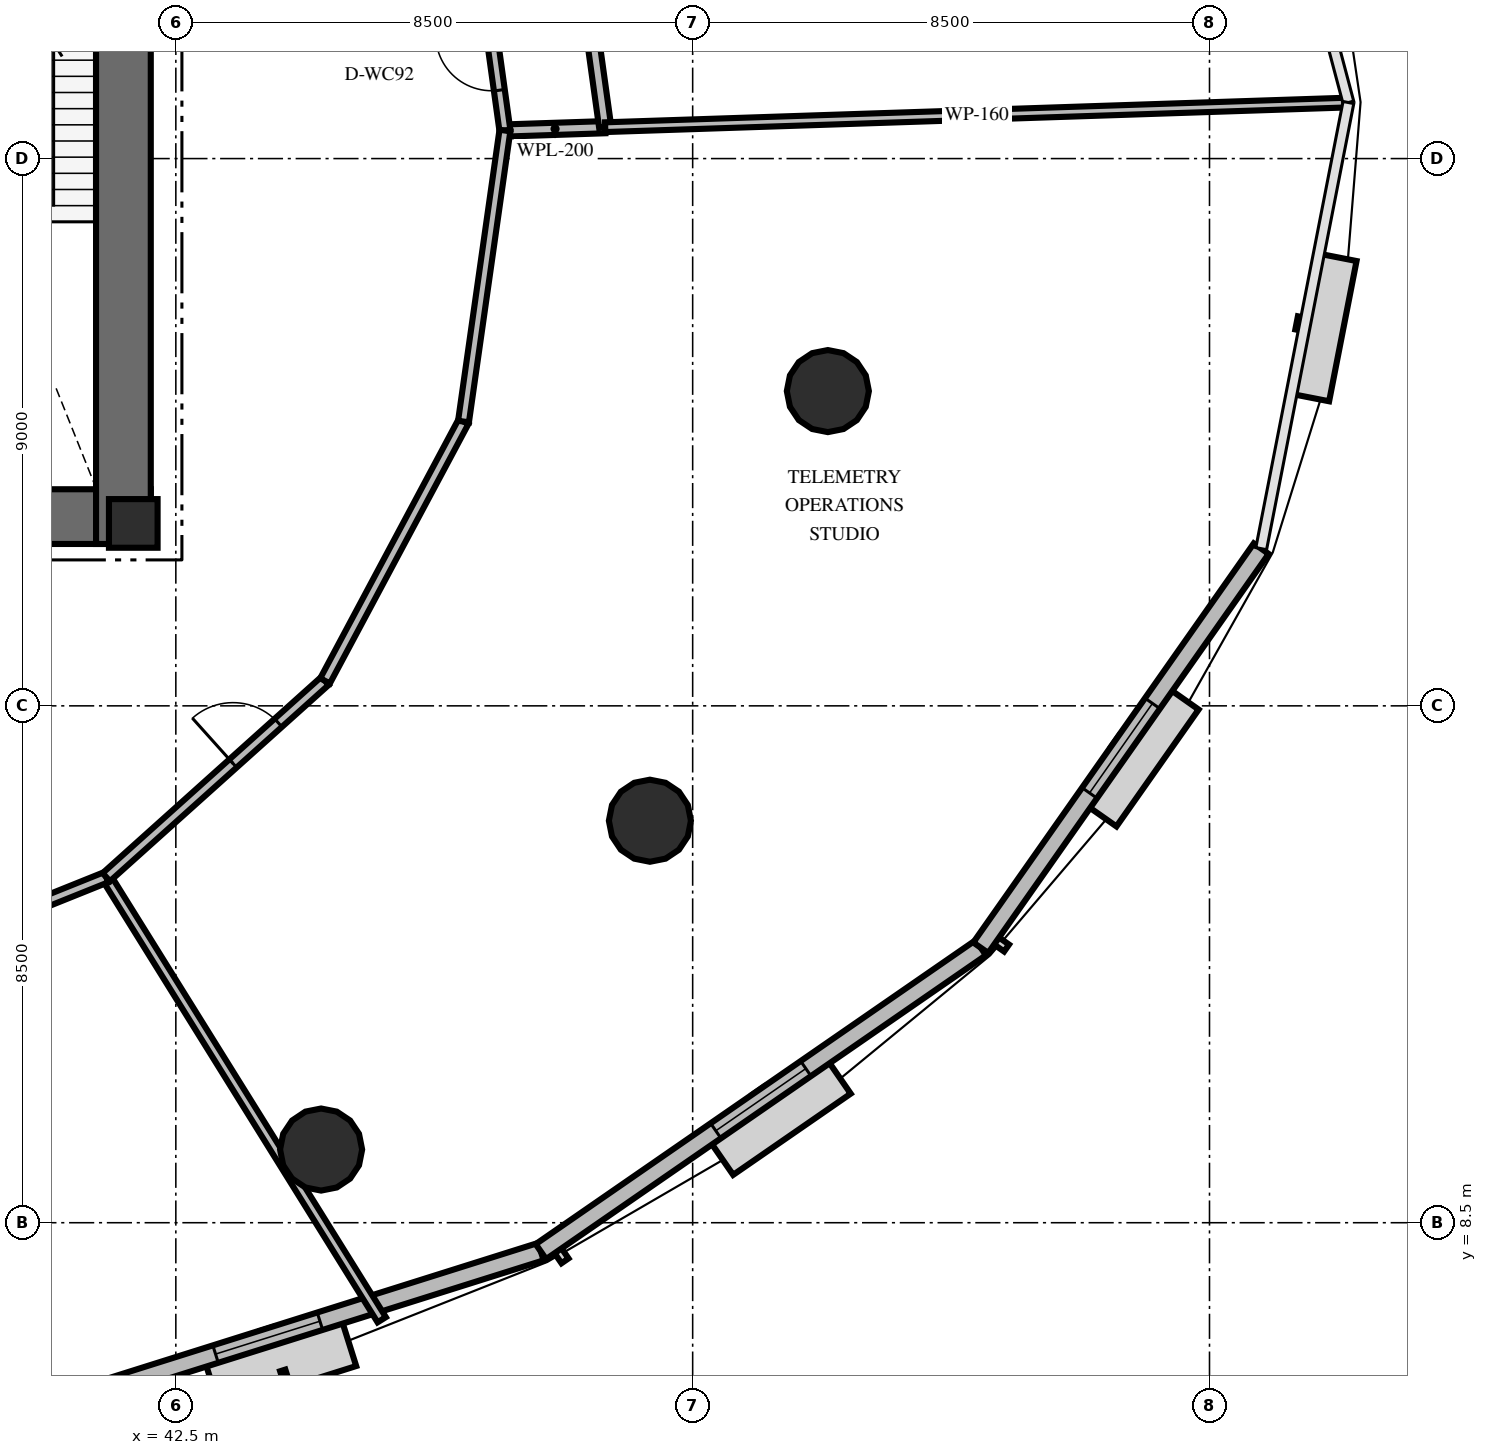
"""IFC4 building model, lengths in metres.
Left out: names, types, materials, properties, quantities, classifications, styles, units other than length and angle.
Written with IfcOpenShell. Run it as: python <this file> out.ifc"""

import sys

from ifc_helpers import new_model, si_unit, direction, frame, frame_2d, origin, origin_2d, place, context, subcontext, project, spatial, rectangle, circle, extrude, element, fill, save


model = new_model("IFC4")
c1 = context("Model", 3, precision=1e-05, world=origin(), true_north=direction((0.0, 1.0)))
c2 = subcontext(c1, "Body", "Model", "MODEL_VIEW")
j1 = project(units=[si_unit("LENGTHUNIT", "METRE"), si_unit("PLANEANGLEUNIT", "RADIAN")], contexts=[c1])
p1 = place(None, origin())
s1 = spatial("IfcSite", under=j1, at=p1, CompositionType="ELEMENT")
p2 = place(p1, origin())
s2 = spatial("IfcBuilding", under=s1, at=p2, CompositionType="ELEMENT")
p3 = place(p2, frame((0.0, 0.0, 38.4)))
s3 = spatial("IfcBuildingStorey", under=s2, at=p3, CompositionType="ELEMENT", Elevation=38.4)
p4 = place(p3, frame((25.922, 20.112, 0.0), z_axis=(0.0, 0.0, 1.0), x_axis=(1.0, 0.0, 0.0)))
e1 = element("IfcWall", 1, at=p4, inside=s3, PredefinedType="SHEAR", context=c2, shape_type="SweptSolid", body=[
    extrude(rectangle(XDim=16.166, YDim=0.9, at=frame_2d((8.083, 0.0))), origin(), (0.0, 0.0, 1.0), 4.2),
])
p5 = place(p3, frame((41.638, 19.662, 0.0), z_axis=(0.0, 0.0, 1.0), x_axis=(0.0, 1.0, 0.0)))
e2 = element("IfcWall", 2, at=p5, inside=s3, PredefinedType="SHEAR", context=c2, shape_type="SweptSolid", body=[
    extrude(rectangle(XDim=10.876, YDim=0.9, at=frame_2d((5.438, 0.0))), origin(), (0.0, 0.0, 1.0), 4.2),
])
p6 = place(p3, frame((41.8, 20.0, 0.0), z_axis=(0.0, 0.0, 1.0), x_axis=(1.0, 0.0, 0.0)))
e3 = element("IfcColumn", 3, at=p6, inside=s3, PredefinedType="PILASTER", context=c2, shape_type="SweptSolid", body=[
    extrude(rectangle(XDim=0.8, YDim=0.8, at=origin_2d()), origin(), (0.0, 0.0, 1.0), 4.2),
])
for number, where, z_axis, x_axis in (
    (4, (44.889, 9.703, 0.0), (0.0, 0.0, 1.0), (1.0, 0.0, 0.0)),
    (5, (50.297, 15.111, 0.0), (0.0, 0.0, 1.0), (1.0, 0.0, 0.0)),
    (6, (53.223, 22.176, 0.0), (0.0, 0.0, 1.0), (1.0, 0.0, 0.0)),
):
    element("IfcColumn", number, at=place(p3, frame(where, z_axis=z_axis, x_axis=x_axis)), inside=s3, PredefinedType="COLUMN", context=c2, shape_type="SweptSolid", body=[
        extrude(circle(Radius=0.675, at=origin_2d()), origin(), (0.0, 0.0, 1.0), 4.2),
    ])
p7 = place(p3, frame((39.52, 5.195, 0.0), z_axis=(0.0, 0.0, 1.0), x_axis=(0.953813909123, 0.300398113782, 0.0)))
e7 = element("IfcWall", 7, at=p7, inside=s3, PredefinedType="SOLIDWALL", context=c2, shape_type="SweptSolid", body=[
    extrude(rectangle(XDim=9.419, YDim=0.3, at=frame_2d((4.709, 0.0))), origin(), (0.0, 0.0, 1.0), 3.0),
])
p8 = place(p7, frame((3.809, 0.0, 0.8)))
e8 = element("IfcOpeningElement", 8, at=p8, cuts=e7, PredefinedType="OPENING", context=c2, shape_type="SweptSolid", body=[
    extrude(rectangle(XDim=1.8, YDim=1.95, at=frame_2d((0.9, 0.975))), frame((0.0, 0.16, 0.0), z_axis=(0.0, -1.0, 0.0), x_axis=(1.0, 0.0, 0.0)), (0.0, 0.0, 1.0), 0.32),
])
p9 = place(p3, frame((48.504, 8.025, 0.0), z_axis=(0.0, 0.0, 1.0), x_axis=(0.82276952824, 0.568375143193, 0.0)))
e9 = element("IfcWall", 9, at=p9, inside=s3, PredefinedType="SOLIDWALL", context=c2, shape_type="SweptSolid", body=[
    extrude(rectangle(XDim=8.793, YDim=0.3, at=frame_2d((4.396, 0.0))), origin(), (0.0, 0.0, 1.0), 3.0),
])
p10 = place(p9, frame((3.496, 0.0, 0.8)))
e10 = element("IfcOpeningElement", 10, at=p10, cuts=e9, PredefinedType="OPENING", context=c2, shape_type="SweptSolid", body=[
    extrude(rectangle(XDim=1.8, YDim=1.95, at=frame_2d((0.9, 0.975))), frame((0.0, 0.16, 0.0), z_axis=(0.0, -1.0, 0.0), x_axis=(1.0, 0.0, 0.0)), (0.0, 0.0, 1.0), 0.32),
])
p11 = place(p3, frame((55.738, 13.022, 0.0), z_axis=(0.0, 0.0, 1.0), x_axis=(0.574985163885, 0.818163835251, 0.0)))
e11 = element("IfcWall", 11, at=p11, inside=s3, PredefinedType="SOLIDWALL", context=c2, shape_type="SweptSolid", body=[
    extrude(rectangle(XDim=8.021, YDim=0.3, at=frame_2d((4.011, 0.0))), origin(), (0.0, 0.0, 1.0), 3.0),
])
p12 = place(p11, frame((3.111, 0.0, 0.8)))
e12 = element("IfcOpeningElement", 12, at=p12, cuts=e11, PredefinedType="OPENING", context=c2, shape_type="SweptSolid", body=[
    extrude(rectangle(XDim=1.8, YDim=1.95, at=frame_2d((0.9, 0.975))), frame((0.0, 0.16, 0.0), z_axis=(0.0, -1.0, 0.0), x_axis=(1.0, 0.0, 0.0)), (0.0, 0.0, 1.0), 0.32),
])
p13 = place(p3, frame((47.912, 26.461, 0.0), z_axis=(0.0, 0.0, 1.0), x_axis=(0.999450477054, 0.033147306316, 0.0)))
e13 = element("IfcWall", 13, at=p13, inside=s3, PredefinedType="PLUMBINGWALL", context=c2, shape_type="SweptSolid", body=[
    extrude(rectangle(XDim=1.65, YDim=0.2, at=frame_2d((0.825, 0.0))), origin(), (0.0, 0.0, 1.0), 3.0),
])
p14 = place(p3, frame((49.561, 26.516, 0.0), z_axis=(0.0, 0.0, 1.0), x_axis=(-0.13739872662, 0.990515820128, 0.0)))
e14 = element("IfcWall", 14, at=p14, inside=s3, PredefinedType="PLUMBINGWALL", context=c2, shape_type="SweptSolid", body=[
    extrude(rectangle(XDim=3.255, YDim=0.2, at=frame_2d((1.627, 0.0))), origin(), (0.0, 0.0, 1.0), 3.0),
])
p15 = place(p3, frame((47.912, 26.461, 0.0), z_axis=(0.0, 0.0, 1.0), x_axis=(-0.137415192003, 0.990513536004, 0.0)))
e15 = element("IfcWall", 15, at=p15, inside=s3, PredefinedType="PARTITIONING", context=c2, shape_type="SweptSolid", body=[
    extrude(rectangle(XDim=2.91, YDim=0.18, at=frame_2d((1.455, 0.0))), origin(), (0.0, 0.0, 1.0), 3.0),
])
p16 = place(p15, frame((0.669, 0.0, 0.0)))
e16 = element("IfcOpeningElement", 16, at=p16, cuts=e15, PredefinedType="OPENING", context=c2, shape_type="SweptSolid", body=[
    extrude(rectangle(XDim=0.92, YDim=2.1, at=frame_2d((0.46, 1.05))), frame((0.0, 0.1, 0.0), z_axis=(0.0, -1.0, 0.0), x_axis=(1.0, 0.0, 0.0)), (0.0, 0.0, 1.0), 0.2),
])
p17 = place(p3, frame((49.561, 26.516, 0.0), z_axis=(0.0, 0.0, 1.0), x_axis=(0.999450145457, 0.033157303046, 0.0)))
e17 = element("IfcWall", 17, at=p17, inside=s3, PredefinedType="PARTITIONING", context=c2, shape_type="SweptSolid", body=[
    extrude(rectangle(XDim=12.23, YDim=0.16, at=frame_2d((6.115, 0.0))), origin(), (0.0, 0.0, 1.0), 3.0),
])
p18 = place(p3, frame((41.356, 14.182, 0.0), z_axis=(0.0, 0.0, 1.0), x_axis=(0.528423694277, -0.848980800329, 0.0)))
e18 = element("IfcWall", 18, at=p18, inside=s3, PredefinedType="PARTITIONING", context=c2, shape_type="SweptSolid", body=[
    extrude(rectangle(XDim=8.573, YDim=0.16, at=frame_2d((4.286, 0.0))), origin(), (0.0, 0.0, 1.0), 3.0),
])
p19 = place(p3, frame((36.87, 12.379, 0.0), z_axis=(0.0, 0.0, 1.0), x_axis=(0.927834482528, 0.37299218897, 0.0)))
e19 = element("IfcWall", 19, at=p19, inside=s3, PredefinedType="PARTITIONING", context=c2, shape_type="SweptSolid", body=[
    extrude(rectangle(XDim=4.834, YDim=0.18, at=frame_2d((2.417, 0.0))), origin(), (0.0, 0.0, 1.0), 3.0),
])
p20 = place(p19, frame((1.917, 0.0, 0.0)))
e20 = element("IfcOpeningElement", 20, at=p20, cuts=e19, PredefinedType="OPENING", context=c2, shape_type="SweptSolid", body=[
    extrude(rectangle(XDim=1.0, YDim=2.15, at=frame_2d((0.5, 1.075))), frame((0.0, 0.1, 0.0), z_axis=(0.0, -1.0, 0.0), x_axis=(1.0, 0.0, 0.0)), (0.0, 0.0, 1.0), 0.2),
])
p21 = place(p3, frame((41.356, 14.182, 0.0), z_axis=(0.0, 0.0, 1.0), x_axis=(0.744302787757, 0.667842316821, 0.0)))
e21 = element("IfcWall", 21, at=p21, inside=s3, PredefinedType="PARTITIONING", context=c2, shape_type="SweptSolid", body=[
    extrude(rectangle(XDim=4.834, YDim=0.18, at=frame_2d((2.417, 0.0))), origin(), (0.0, 0.0, 1.0), 3.0),
])
p22 = place(p21, frame((2.801, 0.0, 0.0)))
e22 = element("IfcOpeningElement", 22, at=p22, cuts=e21, PredefinedType="OPENING", context=c2, shape_type="SweptSolid", body=[
    extrude(rectangle(XDim=1.0, YDim=2.15, at=frame_2d((0.5, 1.075))), frame((0.0, 0.1, 0.0), z_axis=(0.0, -1.0, 0.0), x_axis=(1.0, 0.0, 0.0)), (0.0, 0.0, 1.0), 0.2),
])
p23 = place(p3, frame((44.954, 17.411, 0.0), z_axis=(0.0, 0.0, 1.0), x_axis=(0.471031159724, 0.882116571984, 0.0)))
e23 = element("IfcWall", 23, at=p23, inside=s3, PredefinedType="PARTITIONING", context=c2, shape_type="SweptSolid", body=[
    extrude(rectangle(XDim=4.834, YDim=0.18, at=frame_2d((2.417, 0.0))), origin(), (0.0, 0.0, 1.0), 3.0),
])
p24 = place(p3, frame((47.231, 21.675, 0.0), z_axis=(0.0, 0.0, 1.0), x_axis=(0.140898144809, 0.990024097075, 0.0)))
e24 = element("IfcWall", 24, at=p24, inside=s3, PredefinedType="PARTITIONING", context=c2, shape_type="SweptSolid", body=[
    extrude(rectangle(XDim=4.834, YDim=0.18, at=frame_2d((2.417, 0.0))), origin(), (0.0, 0.0, 1.0), 3.0),
])
p25 = place(p8, origin())
e25 = element("IfcWindow", 25, at=p25, inside=s3, PartitioningType="SINGLE_PANEL", PredefinedType="WINDOW", context=c2, shape_type="SweptSolid", body=[
    extrude(rectangle(XDim=1.8, YDim=1.95, at=frame_2d((0.9, 0.975))), frame((0.0, 0.03, 0.0), z_axis=(0.0, -1.0, 0.0), x_axis=(1.0, 0.0, 0.0)), (0.0, 0.0, 1.0), 0.06),
])
fill(e8, e25)
p26 = place(p10, origin())
e26 = element("IfcWindow", 26, at=p26, inside=s3, PartitioningType="SINGLE_PANEL", PredefinedType="WINDOW", context=c2, shape_type="SweptSolid", body=[
    extrude(rectangle(XDim=1.8, YDim=1.95, at=frame_2d((0.9, 0.975))), frame((0.0, 0.03, 0.0), z_axis=(0.0, -1.0, 0.0), x_axis=(1.0, 0.0, 0.0)), (0.0, 0.0, 1.0), 0.06),
])
fill(e10, e26)
p27 = place(p12, origin())
e27 = element("IfcWindow", 27, at=p27, inside=s3, PartitioningType="SINGLE_PANEL", PredefinedType="WINDOW", context=c2, shape_type="SweptSolid", body=[
    extrude(rectangle(XDim=1.8, YDim=1.95, at=frame_2d((0.9, 0.975))), frame((0.0, 0.03, 0.0), z_axis=(0.0, -1.0, 0.0), x_axis=(1.0, 0.0, 0.0)), (0.0, 0.0, 1.0), 0.06),
])
fill(e12, e27)
p28 = place(p16, origin())
e28 = element("IfcDoor", 28, at=p28, inside=s3, OperationType="SINGLE_SWING_RIGHT", PredefinedType="DOOR", context=c2, shape_type="SweptSolid", body=[
    extrude(rectangle(XDim=0.92, YDim=2.1, at=frame_2d((0.46, 1.05))), frame((0.0, 0.025, 0.0), z_axis=(0.0, -1.0, 0.0), x_axis=(1.0, 0.0, 0.0)), (0.0, 0.0, 1.0), 0.05),
])
fill(e16, e28)
p29 = place(p22, origin())
e29 = element("IfcDoor", 29, at=p29, inside=s3, OperationType="SINGLE_SWING_LEFT", PredefinedType="DOOR", context=c2, shape_type="SweptSolid", body=[
    extrude(rectangle(XDim=1.0, YDim=2.15, at=frame_2d((0.5, 1.075))), frame((0.0, 0.025, 0.0), z_axis=(0.0, -1.0, 0.0), x_axis=(1.0, 0.0, 0.0)), (0.0, 0.0, 1.0), 0.05),
])
fill(e22, e29)
save(model, sys.argv[1])
